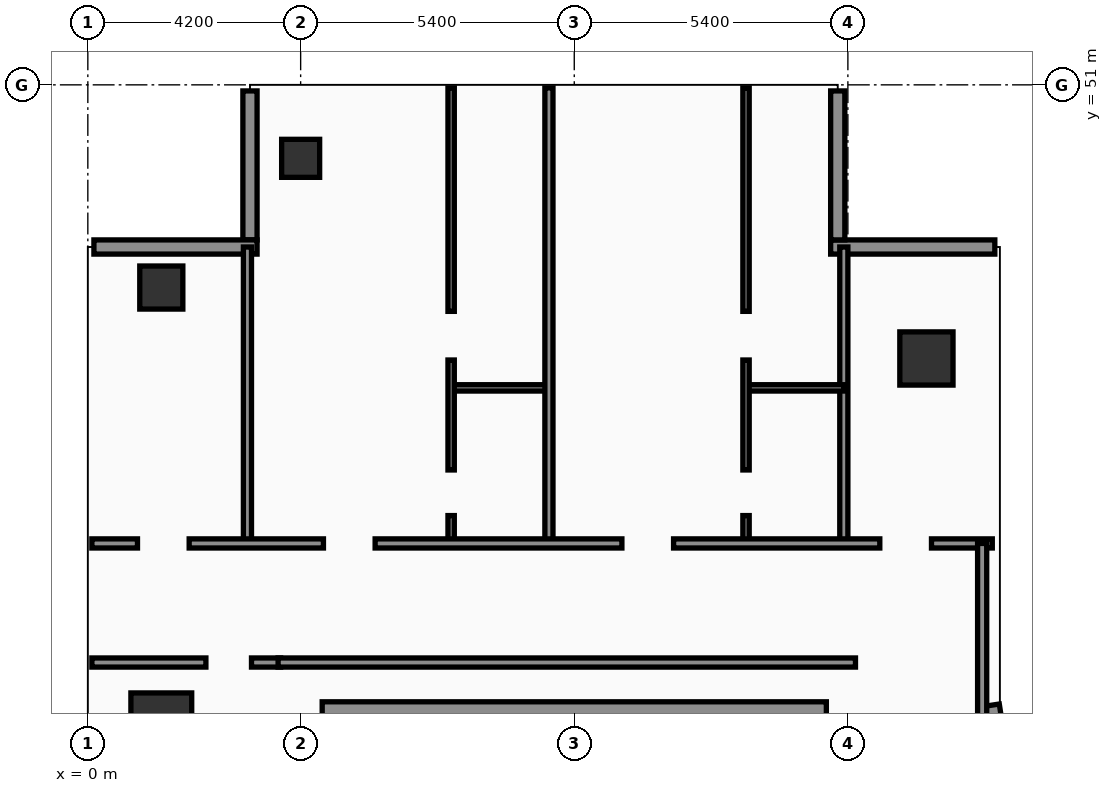
"""IFC4 building model, lengths in metres.
Left out: names, types, materials, properties, quantities, classifications, styles, units other than length and angle.
Written with IfcOpenShell. Run it as: python <this file> out.ifc"""

import sys

from ifc_helpers import new_model, si_unit, direction, frame, frame_2d, origin, origin_2d, place, context, subcontext, project, spatial, rectangle, hollow_rectangle, extrude, element, fill, save


model = new_model("IFC4")
c1 = context("Model", 3, precision=1e-05, world=origin(), true_north=direction((0.0, 1.0)))
c2 = subcontext(c1, "Body", "Model", "MODEL_VIEW")
j1 = project(units=[si_unit("LENGTHUNIT", "METRE"), si_unit("PLANEANGLEUNIT", "RADIAN")], contexts=[c1])
p1 = place(None, origin())
s1 = spatial("IfcSite", under=j1, at=p1, CompositionType="ELEMENT")
p2 = place(p1, origin())
s2 = spatial("IfcBuilding", under=s1, at=p2, CompositionType="ELEMENT")
p3 = place(p2, frame((0.0, 0.0, 116.4)))
s3 = spatial("IfcBuildingStorey", under=s2, at=p3, CompositionType="ELEMENT", Elevation=116.4)
p4 = place(p3, frame((4.625, 38.4, 0.0), z_axis=(0.0, 0.0, 1.0), x_axis=(1.0, 0.0, 0.0)))
e1 = element("IfcWall", 1, at=p4, inside=s3, PredefinedType="SHEAR", context=c2, shape_type="SweptSolid", body=[
    extrude(rectangle(XDim=9.95, YDim=0.85, at=frame_2d((4.975, 0.0))), origin(), (0.0, 0.0, 1.0), 3.56),
])
p5 = place(p3, frame((1.45, 38.4, 0.0), z_axis=(0.0, 0.0, 1.0), x_axis=(1.0, 0.0, 0.0)))
e2 = element("IfcColumn", 2, at=p5, inside=s3, PredefinedType="COLUMN", context=c2, shape_type="SweptSolid", body=[
    extrude(rectangle(XDim=1.2, YDim=1.2, at=origin_2d()), origin(), (0.0, 0.0, 1.0), 3.56),
])
p6 = place(p3, frame((1.45, 47.0, 0.0), z_axis=(0.0, 0.0, 1.0), x_axis=(1.0, 0.0, 0.0)))
e3 = element("IfcColumn", 3, at=p6, inside=s3, PredefinedType="COLUMN", context=c2, shape_type="SweptSolid", body=[
    extrude(hollow_rectangle(XDim=0.85, YDim=0.85, WallThickness=0.036, at=origin_2d()), origin(), (0.0, 0.0, 1.0), 3.56),
])
p7 = place(p3, frame((4.2, 49.55, 0.0), z_axis=(0.0, 0.0, 1.0), x_axis=(1.0, 0.0, 0.0)))
e4 = element("IfcColumn", 4, at=p7, inside=s3, PredefinedType="COLUMN", context=c2, shape_type="SweptSolid", body=[
    extrude(hollow_rectangle(XDim=0.75, YDim=0.75, WallThickness=0.032, at=origin_2d()), origin(), (0.0, 0.0, 1.0), 3.56),
])
p8 = place(p3, frame((16.55, 45.6, 0.0), z_axis=(0.0, 0.0, 1.0), x_axis=(1.0, 0.0, 0.0)))
e5 = element("IfcColumn", 5, at=p8, inside=s3, PredefinedType="COLUMN", context=c2, shape_type="SweptSolid", body=[
    extrude(rectangle(XDim=1.05, YDim=1.05, at=origin_2d()), origin(), (0.0, 0.0, 1.0), 3.56),
])
p9 = place(p3, frame((17.962, 38.03, 0.0), z_axis=(0.0, 0.0, 1.0), x_axis=(-0.15141125477, 0.988470855377, 0.0)))
e6 = element("IfcWall", 6, at=p9, inside=s3, PredefinedType="SOLIDWALL", context=c2, shape_type="SweptSolid", body=[
    extrude(rectangle(XDim=0.739, YDim=0.28, at=frame_2d((0.369, 0.0))), origin(), (0.0, 0.0, 1.0), 3.56),
])
p10 = place(p3, frame((17.9, 47.8, 0.0), z_axis=(0.0, 0.0, 1.0), x_axis=(-1.0, 0.0, 0.0)))
e7 = element("IfcWall", 7, at=p10, inside=s3, PredefinedType="SOLIDWALL", context=c2, shape_type="SweptSolid", body=[
    extrude(rectangle(XDim=3.24, YDim=0.28, at=frame_2d((1.62, 0.0))), origin(), (0.0, 0.0, 1.0), 3.56),
])
p11 = place(p3, frame((14.8, 47.94, 0.0), z_axis=(0.0, 0.0, 1.0), x_axis=(0.0, 1.0, 0.0)))
e8 = element("IfcWall", 8, at=p11, inside=s3, PredefinedType="SOLIDWALL", context=c2, shape_type="SweptSolid", body=[
    extrude(rectangle(XDim=2.94, YDim=0.28, at=frame_2d((1.47, 0.0))), origin(), (0.0, 0.0, 1.0), 3.56),
])
p12 = place(p3, frame((3.2, 50.88, 0.0), z_axis=(0.0, 0.0, 1.0), x_axis=(0.0, -1.0, 0.0)))
e9 = element("IfcWall", 9, at=p12, inside=s3, PredefinedType="SOLIDWALL", context=c2, shape_type="SweptSolid", body=[
    extrude(rectangle(XDim=2.94, YDim=0.28, at=frame_2d((1.47, 0.0))), origin(), (0.0, 0.0, 1.0), 3.04),
])
p13 = place(p3, frame((3.34, 47.8, 0.0), z_axis=(0.0, 0.0, 1.0), x_axis=(-1.0, 0.0, 0.0)))
e10 = element("IfcWall", 10, at=p13, inside=s3, PredefinedType="SOLIDWALL", context=c2, shape_type="SweptSolid", body=[
    extrude(rectangle(XDim=3.22, YDim=0.28, at=frame_2d((1.61, 0.0))), origin(), (0.0, 0.0, 1.0), 3.04),
])
p14 = place(p3, frame((0.08, 39.6, 0.0), z_axis=(0.0, 0.0, 1.0), x_axis=(1.0, 0.0, 0.0)))
e11 = element("IfcWall", 11, at=p14, inside=s3, PredefinedType="PARTITIONING", context=c2, shape_type="SweptSolid", body=[
    extrude(rectangle(XDim=3.725, YDim=0.18, at=frame_2d((1.862, 0.0))), origin(), (0.0, 0.0, 1.0), 2.84),
])
p15 = place(p14, frame((2.25, 0.0, 0.0)))
e12 = element("IfcOpeningElement", 12, at=p15, cuts=e11, PredefinedType="OPENING", context=c2, shape_type="SweptSolid", body=[
    extrude(rectangle(XDim=0.9, YDim=2.15, at=frame_2d((0.45, 1.075))), frame((0.0, 0.1, 0.0), z_axis=(0.0, -1.0, 0.0), x_axis=(1.0, 0.0, 0.0)), (0.0, 0.0, 1.0), 0.2),
])
p16 = place(p3, frame((3.15, 41.95, 0.0), z_axis=(0.0, 0.0, 1.0), x_axis=(0.0, 1.0, 0.0)))
e13 = element("IfcWall", 13, at=p16, inside=s3, PredefinedType="PARTITIONING", context=c2, shape_type="SweptSolid", body=[
    extrude(rectangle(XDim=5.85, YDim=0.16, at=frame_2d((2.925, 0.0))), origin(), (0.0, 0.0, 1.0), 3.14),
])
p17 = place(p3, frame((14.92, 41.95, 0.0), z_axis=(0.0, 0.0, 1.0), x_axis=(0.0, 1.0, 0.0)))
e14 = element("IfcWall", 14, at=p17, inside=s3, PredefinedType="PARTITIONING", context=c2, shape_type="SweptSolid", body=[
    extrude(rectangle(XDim=5.85, YDim=0.16, at=frame_2d((2.925, 0.0))), origin(), (0.0, 0.0, 1.0), 3.04),
])
p18 = place(p3, frame((7.17, 45.02, 0.0), z_axis=(0.0, 0.0, 1.0), x_axis=(1.0, 0.0, 0.0)))
e15 = element("IfcWall", 15, at=p18, inside=s3, PredefinedType="PARTITIONING", context=c2, shape_type="SweptSolid", body=[
    extrude(rectangle(XDim=1.93, YDim=0.125, at=frame_2d((0.965, 0.0))), origin(), (0.0, 0.0, 1.0), 3.56),
])
p19 = place(p3, frame((7.17, 41.95, 0.0), z_axis=(0.0, 0.0, 1.0), x_axis=(0.0, 1.0, 0.0)))
e16 = element("IfcWall", 16, at=p19, inside=s3, PredefinedType="PARTITIONING", context=c2, shape_type="SweptSolid", body=[
    extrude(rectangle(XDim=8.99, YDim=0.125, at=frame_2d((4.495, 0.0))), origin(), (0.0, 0.0, 1.0), 3.04),
])
p20 = place(p19, frame((0.55, 0.0, 0.0)))
e17 = element("IfcOpeningElement", 17, at=p20, cuts=e16, PredefinedType="OPENING", context=c2, shape_type="SweptSolid", body=[
    extrude(rectangle(XDim=0.9, YDim=2.15, at=frame_2d((0.45, 1.075))), frame((0.0, 0.073, 0.0), z_axis=(0.0, -1.0, 0.0), x_axis=(1.0, 0.0, 0.0)), (0.0, 0.0, 1.0), 0.145),
])
p21 = place(p19, frame((3.62, 0.0, 0.0)))
e18 = element("IfcOpeningElement", 18, at=p21, cuts=e16, PredefinedType="OPENING", context=c2, shape_type="SweptSolid", body=[
    extrude(rectangle(XDim=0.96, YDim=2.2, at=frame_2d((0.48, 1.1))), frame((0.0, 0.073, 0.0), z_axis=(0.0, -1.0, 0.0), x_axis=(1.0, 0.0, 0.0)), (0.0, 0.0, 1.0), 0.145),
])
p22 = place(p3, frame((12.99, 45.02, 0.0), z_axis=(0.0, 0.0, 1.0), x_axis=(1.0, 0.0, 0.0)))
e19 = element("IfcWall", 19, at=p22, inside=s3, PredefinedType="PARTITIONING", context=c2, shape_type="SweptSolid", body=[
    extrude(rectangle(XDim=1.93, YDim=0.125, at=frame_2d((0.965, 0.0))), origin(), (0.0, 0.0, 1.0), 3.56),
])
p23 = place(p3, frame((12.99, 41.95, 0.0), z_axis=(0.0, 0.0, 1.0), x_axis=(0.0, 1.0, 0.0)))
e20 = element("IfcWall", 20, at=p23, inside=s3, PredefinedType="PARTITIONING", context=c2, shape_type="SweptSolid", body=[
    extrude(rectangle(XDim=8.99, YDim=0.125, at=frame_2d((4.495, 0.0))), origin(), (0.0, 0.0, 1.0), 3.04),
])
p24 = place(p23, frame((0.55, 0.0, 0.0)))
e21 = element("IfcOpeningElement", 21, at=p24, cuts=e20, PredefinedType="OPENING", context=c2, shape_type="SweptSolid", body=[
    extrude(rectangle(XDim=0.9, YDim=2.15, at=frame_2d((0.45, 1.075))), frame((0.0, 0.073, 0.0), z_axis=(0.0, -1.0, 0.0), x_axis=(1.0, 0.0, 0.0)), (0.0, 0.0, 1.0), 0.145),
])
p25 = place(p23, frame((3.62, 0.0, 0.0)))
e22 = element("IfcOpeningElement", 22, at=p25, cuts=e20, PredefinedType="OPENING", context=c2, shape_type="SweptSolid", body=[
    extrude(rectangle(XDim=0.96, YDim=2.2, at=frame_2d((0.48, 1.1))), frame((0.0, 0.073, 0.0), z_axis=(0.0, -1.0, 0.0), x_axis=(1.0, 0.0, 0.0)), (0.0, 0.0, 1.0), 0.145),
])
p26 = place(p3, frame((9.1, 41.95, 0.0), z_axis=(0.0, 0.0, 1.0), x_axis=(0.0, 1.0, 0.0)))
e23 = element("IfcWall", 23, at=p26, inside=s3, PredefinedType="PARTITIONING", context=c2, shape_type="SweptSolid", body=[
    extrude(rectangle(XDim=8.99, YDim=0.16, at=frame_2d((4.495, 0.0))), origin(), (0.0, 0.0, 1.0), 3.04),
])
p27 = place(p3, frame((0.08, 41.95, 0.0), z_axis=(0.0, 0.0, 1.0), x_axis=(1.0, 0.0, 0.0)))
e24 = element("IfcWall", 24, at=p27, inside=s3, PredefinedType="PARTITIONING", context=c2, shape_type="SweptSolid", body=[
    extrude(rectangle(XDim=17.77, YDim=0.18, at=frame_2d((8.885, 0.0))), origin(), (0.0, 0.0, 1.0), 2.84),
])
p28 = place(p27, frame((0.9, 0.0, 0.0)))
e25 = element("IfcOpeningElement", 25, at=p28, cuts=e24, PredefinedType="OPENING", context=c2, shape_type="SweptSolid", body=[
    extrude(rectangle(XDim=1.02, YDim=2.2, at=frame_2d((0.51, 1.1))), frame((0.0, 0.1, 0.0), z_axis=(0.0, -1.0, 0.0), x_axis=(1.0, 0.0, 0.0)), (0.0, 0.0, 1.0), 0.2),
])
p29 = place(p27, frame((4.57, 0.0, 0.0)))
e26 = element("IfcOpeningElement", 26, at=p29, cuts=e24, PredefinedType="OPENING", context=c2, shape_type="SweptSolid", body=[
    extrude(rectangle(XDim=1.02, YDim=2.2, at=frame_2d((0.51, 1.1))), frame((0.0, 0.1, 0.0), z_axis=(0.0, -1.0, 0.0), x_axis=(1.0, 0.0, 0.0)), (0.0, 0.0, 1.0), 0.2),
])
p30 = place(p27, frame((10.46, 0.0, 0.0)))
e27 = element("IfcOpeningElement", 27, at=p30, cuts=e24, PredefinedType="OPENING", context=c2, shape_type="SweptSolid", body=[
    extrude(rectangle(XDim=1.02, YDim=2.2, at=frame_2d((0.51, 1.1))), frame((0.0, 0.1, 0.0), z_axis=(0.0, -1.0, 0.0), x_axis=(1.0, 0.0, 0.0)), (0.0, 0.0, 1.0), 0.2),
])
p31 = place(p27, frame((15.55, 0.0, 0.0)))
e28 = element("IfcOpeningElement", 28, at=p31, cuts=e24, PredefinedType="OPENING", context=c2, shape_type="SweptSolid", body=[
    extrude(rectangle(XDim=1.02, YDim=2.2, at=frame_2d((0.51, 1.1))), frame((0.0, 0.1, 0.0), z_axis=(0.0, -1.0, 0.0), x_axis=(1.0, 0.0, 0.0)), (0.0, 0.0, 1.0), 0.2),
])
p32 = place(p3, frame((17.65, 24.3, 0.0), z_axis=(0.0, 0.0, 1.0), x_axis=(0.0, 1.0, 0.0)))
e29 = element("IfcWall", 29, at=p32, inside=s3, PredefinedType="PARTITIONING", context=c2, shape_type="SweptSolid", body=[
    extrude(rectangle(XDim=17.65, YDim=0.18, at=frame_2d((8.825, 0.0))), origin(), (0.0, 0.0, 1.0), 2.84),
])
p33 = place(p3, frame((3.755, 39.6, 0.0), z_axis=(0.0, 0.0, 1.0), x_axis=(1.0, 0.0, 0.0)))
e30 = element("IfcWall", 30, at=p33, inside=s3, PredefinedType="PARTITIONING", context=c2, shape_type="SweptSolid", body=[
    extrude(rectangle(XDim=11.395, YDim=0.18, at=frame_2d((5.698, 0.0))), origin(), (0.0, 0.0, 1.0), 2.84),
])
p34 = place(p15, origin())
e31 = element("IfcDoor", 31, at=p34, inside=s3, OperationType="SINGLE_SWING_LEFT", PredefinedType="DOOR", context=c2, shape_type="SweptSolid", body=[
    extrude(rectangle(XDim=0.9, YDim=2.15, at=frame_2d((0.45, 1.075))), frame((0.0, 0.025, 0.0), z_axis=(0.0, -1.0, 0.0), x_axis=(1.0, 0.0, 0.0)), (0.0, 0.0, 1.0), 0.05),
])
fill(e12, e31)
p35 = place(p20, origin())
e32 = element("IfcDoor", 32, at=p35, inside=s3, OperationType="SINGLE_SWING_LEFT", PredefinedType="DOOR", context=c2, shape_type="SweptSolid", body=[
    extrude(rectangle(XDim=0.9, YDim=2.15, at=frame_2d((0.45, 1.075))), frame((0.0, 0.025, 0.0), z_axis=(0.0, -1.0, 0.0), x_axis=(1.0, 0.0, 0.0)), (0.0, 0.0, 1.0), 0.05),
])
fill(e17, e32)
p36 = place(p21, origin())
e33 = element("IfcDoor", 33, at=p36, inside=s3, OperationType="SINGLE_SWING_RIGHT", PredefinedType="DOOR", context=c2, shape_type="SweptSolid", body=[
    extrude(rectangle(XDim=0.96, YDim=2.2, at=frame_2d((0.48, 1.1))), frame((0.0, 0.025, 0.0), z_axis=(0.0, -1.0, 0.0), x_axis=(1.0, 0.0, 0.0)), (0.0, 0.0, 1.0), 0.05),
])
fill(e18, e33)
p37 = place(p24, origin())
e34 = element("IfcDoor", 34, at=p37, inside=s3, OperationType="SINGLE_SWING_LEFT", PredefinedType="DOOR", context=c2, shape_type="SweptSolid", body=[
    extrude(rectangle(XDim=0.9, YDim=2.15, at=frame_2d((0.45, 1.075))), frame((0.0, 0.025, 0.0), z_axis=(0.0, -1.0, 0.0), x_axis=(1.0, 0.0, 0.0)), (0.0, 0.0, 1.0), 0.05),
])
fill(e21, e34)
p38 = place(p25, origin())
e35 = element("IfcDoor", 35, at=p38, inside=s3, OperationType="SINGLE_SWING_RIGHT", PredefinedType="DOOR", context=c2, shape_type="SweptSolid", body=[
    extrude(rectangle(XDim=0.96, YDim=2.2, at=frame_2d((0.48, 1.1))), frame((0.0, 0.025, 0.0), z_axis=(0.0, -1.0, 0.0), x_axis=(1.0, 0.0, 0.0)), (0.0, 0.0, 1.0), 0.05),
])
fill(e22, e35)
p39 = place(p28, origin())
e36 = element("IfcDoor", 36, at=p39, inside=s3, OperationType="SINGLE_SWING_LEFT", PredefinedType="DOOR", context=c2, shape_type="SweptSolid", body=[
    extrude(rectangle(XDim=1.02, YDim=2.2, at=frame_2d((0.51, 1.1))), frame((0.0, 0.025, 0.0), z_axis=(0.0, -1.0, 0.0), x_axis=(1.0, 0.0, 0.0)), (0.0, 0.0, 1.0), 0.05),
])
fill(e25, e36)
p40 = place(p29, origin())
e37 = element("IfcDoor", 37, at=p40, inside=s3, OperationType="SINGLE_SWING_RIGHT", PredefinedType="DOOR", context=c2, shape_type="SweptSolid", body=[
    extrude(rectangle(XDim=1.02, YDim=2.2, at=frame_2d((0.51, 1.1))), frame((0.0, 0.025, 0.0), z_axis=(0.0, -1.0, 0.0), x_axis=(1.0, 0.0, 0.0)), (0.0, 0.0, 1.0), 0.05),
])
fill(e26, e37)
p41 = place(p30, origin())
e38 = element("IfcDoor", 38, at=p41, inside=s3, OperationType="SINGLE_SWING_LEFT", PredefinedType="DOOR", context=c2, shape_type="SweptSolid", body=[
    extrude(rectangle(XDim=1.02, YDim=2.2, at=frame_2d((0.51, 1.1))), frame((0.0, 0.025, 0.0), z_axis=(0.0, -1.0, 0.0), x_axis=(1.0, 0.0, 0.0)), (0.0, 0.0, 1.0), 0.05),
])
fill(e27, e38)
p42 = place(p31, origin())
e39 = element("IfcDoor", 39, at=p42, inside=s3, OperationType="SINGLE_SWING_RIGHT", PredefinedType="DOOR", context=c2, shape_type="SweptSolid", body=[
    extrude(rectangle(XDim=1.02, YDim=2.2, at=frame_2d((0.51, 1.1))), frame((0.0, 0.025, 0.0), z_axis=(0.0, -1.0, 0.0), x_axis=(1.0, 0.0, 0.0)), (0.0, 0.0, 1.0), 0.05),
])
fill(e28, e39)
save(model, sys.argv[1])
